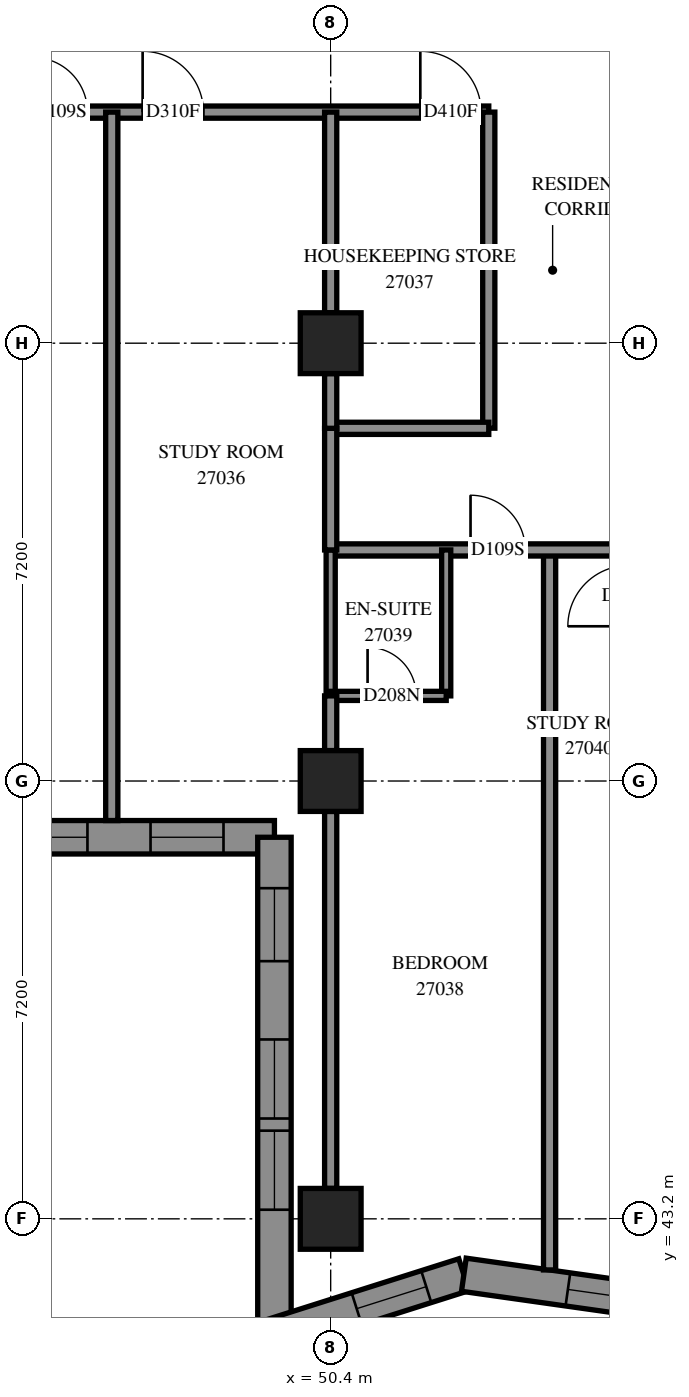
"""IFC4 building model, lengths in metres.
Left out: names, types, materials, properties, quantities, classifications, styles, units other than length and angle.
Written with IfcOpenShell. Run it as: python <this file> out.ifc"""

import sys

from ifc_helpers import new_model, si_unit, direction, frame, frame_2d, origin, origin_2d, place, context, subcontext, project, spatial, polyline, rectangle, outline, extrude, element, fill, save


model = new_model("IFC4")
c1 = context("Model", 3, precision=1e-05, world=origin(), true_north=direction((0.0, 1.0)))
c2 = subcontext(c1, "Body", "Model", "MODEL_VIEW")
j1 = project(units=[si_unit("LENGTHUNIT", "METRE"), si_unit("PLANEANGLEUNIT", "RADIAN")], contexts=[c1])
p1 = place(None, origin())
s1 = spatial("IfcSite", under=j1, at=p1, CompositionType="ELEMENT")
p2 = place(p1, origin())
s2 = spatial("IfcBuilding", under=s1, at=p2, CompositionType="ELEMENT")
p3 = place(p2, frame((0.0, 0.0, 101.6)))
s3 = spatial("IfcBuildingStorey", under=s2, at=p3, CompositionType="ELEMENT", Elevation=101.6)
for number, where, z_axis, x_axis in (
    (1, (50.4, 43.2, 0.0), (0.0, 0.0, 1.0), (1.0, 0.0, 0.0)),
    (2, (50.4, 50.4, 0.0), (0.0, 0.0, 1.0), (1.0, 0.0, 0.0)),
    (3, (50.4, 57.6, 0.0), (0.0, 0.0, 1.0), (1.0, 0.0, 0.0)),
):
    element("IfcColumn", number, at=place(p3, frame(where, z_axis=z_axis, x_axis=x_axis)), inside=s3, PredefinedType="COLUMN", context=c2, shape_type="SweptSolid", body=[
        extrude(rectangle(XDim=1.0, YDim=1.0, at=origin_2d()), origin(), (0.0, 0.0, 1.0), 3.1),
    ])
p4 = place(p3, frame((42.275, 49.475, 0.0), z_axis=(0.0, 0.0, 1.0), x_axis=(1.0, 0.0, 0.0)))
e4 = element("IfcWall", 4, at=p4, inside=s3, PredefinedType="SOLIDWALL", context=c2, shape_type="SweptSolid", body=[
    extrude(outline(polyline([(-0.275, -0.275), (6.925, -0.275), (7.475, 0.275), (0.275, 0.275), (-0.275, -0.275)])), origin(), (0.0, 0.0, 1.0), 3.1),
])
p5 = place(p4, frame((1.325, 0.0, 0.5)))
e5 = element("IfcOpeningElement", 5, at=p5, cuts=e4, PredefinedType="OPENING", context=c2, shape_type="SweptSolid", body=[
    extrude(rectangle(XDim=1.3, YDim=2.45, at=frame_2d((0.65, 1.225))), frame((0.0, 0.285, 0.0), z_axis=(0.0, -1.0, 0.0), x_axis=(1.0, 0.0, 0.0)), (0.0, 0.0, 1.0), 0.57),
])
p6 = place(p4, frame((2.825, 0.0, 0.5)))
e6 = element("IfcOpeningElement", 6, at=p6, cuts=e4, PredefinedType="OPENING", context=c2, shape_type="SweptSolid", body=[
    extrude(rectangle(XDim=1.3, YDim=2.45, at=frame_2d((0.65, 1.225))), frame((0.0, 0.285, 0.0), z_axis=(0.0, -1.0, 0.0), x_axis=(1.0, 0.0, 0.0)), (0.0, 0.0, 1.0), 0.57),
])
p7 = place(p4, frame((5.162, 0.0, 0.5)))
e7 = element("IfcOpeningElement", 7, at=p7, cuts=e4, PredefinedType="OPENING", context=c2, shape_type="SweptSolid", body=[
    extrude(rectangle(XDim=1.2, YDim=2.45, at=frame_2d((0.6, 1.225))), frame((0.0, 0.285, 0.0), z_axis=(0.0, -1.0, 0.0), x_axis=(1.0, 0.0, 0.0)), (0.0, 0.0, 1.0), 0.57),
])
p8 = place(p3, frame((49.475, 49.475, 0.0), z_axis=(0.0, 0.0, 1.0), x_axis=(0.0, -1.0, 0.0)))
e8 = element("IfcWall", 8, at=p8, inside=s3, PredefinedType="SOLIDWALL", context=c2, shape_type="SweptSolid", body=[
    extrude(outline(polyline([(0.275, -0.275), (8.557, -0.275), (7.806, 0.275), (-0.275, 0.275), (0.275, -0.275)])), origin(), (0.0, 0.0, 1.0), 3.1),
])
p9 = place(p8, frame((3.325, 0.0, 0.5)))
e9 = element("IfcOpeningElement", 9, at=p9, cuts=e8, PredefinedType="OPENING", context=c2, shape_type="SweptSolid", body=[
    extrude(rectangle(XDim=1.3, YDim=2.45, at=frame_2d((0.65, 1.225))), frame((0.0, 0.285, 0.0), z_axis=(0.0, -1.0, 0.0), x_axis=(1.0, 0.0, 0.0)), (0.0, 0.0, 1.0), 0.57),
])
p10 = place(p8, frame((4.825, 0.0, 0.5)))
e10 = element("IfcOpeningElement", 10, at=p10, cuts=e8, PredefinedType="OPENING", context=c2, shape_type="SweptSolid", body=[
    extrude(rectangle(XDim=1.3, YDim=2.45, at=frame_2d((0.65, 1.225))), frame((0.0, 0.285, 0.0), z_axis=(0.0, -1.0, 0.0), x_axis=(1.0, 0.0, 0.0)), (0.0, 0.0, 1.0), 0.57),
])
p11 = place(p8, frame((0.838, 0.0, 0.5)))
e11 = element("IfcOpeningElement", 11, at=p11, cuts=e8, PredefinedType="OPENING", context=c2, shape_type="SweptSolid", body=[
    extrude(rectangle(XDim=1.2, YDim=2.45, at=frame_2d((0.6, 1.225))), frame((0.0, 0.285, 0.0), z_axis=(0.0, -1.0, 0.0), x_axis=(1.0, 0.0, 0.0)), (0.0, 0.0, 1.0), 0.57),
])
p12 = place(p3, frame((49.475, 41.294, 0.0), z_axis=(0.0, 0.0, 1.0), x_axis=(0.9532643936, 0.3021373791, 0.0)))
e12 = element("IfcWall", 12, at=p12, inside=s3, PredefinedType="SOLIDWALL", context=c2, shape_type="SweptSolid", body=[
    extrude(outline(polyline([(-0.376, -0.275), (3.205, -0.275), (3.33, 0.275), (0.376, 0.275), (-0.376, -0.275)])), origin(), (0.0, 0.0, 1.0), 3.1),
])
p13 = place(p12, frame((1.419, 0.0, 0.5)))
e13 = element("IfcOpeningElement", 13, at=p13, cuts=e12, PredefinedType="OPENING", context=c2, shape_type="SweptSolid", body=[
    extrude(rectangle(XDim=1.2, YDim=2.45, at=frame_2d((0.6, 1.225))), frame((0.0, 0.285, 0.0), z_axis=(0.0, -1.0, 0.0), x_axis=(1.0, 0.0, 0.0)), (0.0, 0.0, 1.0), 0.57),
])
p14 = place(p3, frame((52.59, 42.281, 0.0), z_axis=(0.0, 0.0, 1.0), x_axis=(0.9901775212, -0.1398158663, 0.0)))
e14 = element("IfcWall", 14, at=p14, inside=s3, PredefinedType="SOLIDWALL", context=c2, shape_type="SweptSolid", body=[
    extrude(outline(polyline([(0.062, -0.275), (3.51, -0.275), (3.432, 0.275), (-0.062, 0.275), (0.062, -0.275)])), origin(), (0.0, 0.0, 1.0), 3.1),
])
p15 = place(p14, frame((1.728, 0.0, 0.5)))
e15 = element("IfcOpeningElement", 15, at=p15, cuts=e14, PredefinedType="OPENING", context=c2, shape_type="SweptSolid", body=[
    extrude(rectangle(XDim=1.2, YDim=2.45, at=frame_2d((0.6, 1.225))), frame((0.0, 0.285, 0.0), z_axis=(0.0, -1.0, 0.0), x_axis=(1.0, 0.0, 0.0)), (0.0, 0.0, 1.0), 0.57),
])
p16 = place(p3, frame((28.8, 61.4, 0.0), z_axis=(0.0, 0.0, 1.0), x_axis=(1.0, 0.0, 0.0)))
e16 = element("IfcWall", 16, at=p16, inside=s3, PredefinedType="PARTITIONING", context=c2, shape_type="SweptSolid", body=[
    extrude(rectangle(XDim=24.2, YDim=0.2, at=frame_2d((12.1, 0.0))), origin(), (0.0, 0.0, 1.0), 3.1),
])
p17 = place(p16, frame((2.3, 0.0, 0.0)))
e17 = element("IfcOpeningElement", 17, at=p17, cuts=e16, PredefinedType="OPENING", context=c2, shape_type="SweptSolid", body=[
    extrude(rectangle(XDim=0.9, YDim=2.1, at=frame_2d((0.45, 1.05))), frame((0.0, 0.11, 0.0), z_axis=(0.0, -1.0, 0.0), x_axis=(1.0, 0.0, 0.0)), (0.0, 0.0, 1.0), 0.22),
])
p18 = place(p16, frame((5.901, 0.0, 0.0)))
e18 = element("IfcOpeningElement", 18, at=p18, cuts=e16, PredefinedType="OPENING", context=c2, shape_type="SweptSolid", body=[
    extrude(rectangle(XDim=0.9, YDim=2.1, at=frame_2d((0.45, 1.05))), frame((0.0, 0.11, 0.0), z_axis=(0.0, -1.0, 0.0), x_axis=(1.0, 0.0, 0.0)), (0.0, 0.0, 1.0), 0.22),
])
p19 = place(p16, frame((11.307, 0.0, 0.0)))
e19 = element("IfcOpeningElement", 19, at=p19, cuts=e16, PredefinedType="OPENING", context=c2, shape_type="SweptSolid", body=[
    extrude(rectangle(XDim=1.0, YDim=2.1, at=frame_2d((0.5, 1.05))), frame((0.0, 0.11, 0.0), z_axis=(0.0, -1.0, 0.0), x_axis=(1.0, 0.0, 0.0)), (0.0, 0.0, 1.0), 0.22),
])
p20 = place(p16, frame((16.7, 0.0, 0.0)))
e20 = element("IfcOpeningElement", 20, at=p20, cuts=e16, PredefinedType="OPENING", context=c2, shape_type="SweptSolid", body=[
    extrude(rectangle(XDim=0.9, YDim=2.1, at=frame_2d((0.45, 1.05))), frame((0.0, 0.11, 0.0), z_axis=(0.0, -1.0, 0.0), x_axis=(1.0, 0.0, 0.0)), (0.0, 0.0, 1.0), 0.22),
])
p21 = place(p16, frame((18.508, 0.0, 0.0)))
e21 = element("IfcOpeningElement", 21, at=p21, cuts=e16, PredefinedType="OPENING", context=c2, shape_type="SweptSolid", body=[
    extrude(rectangle(XDim=1.0, YDim=2.1, at=frame_2d((0.5, 1.05))), frame((0.0, 0.11, 0.0), z_axis=(0.0, -1.0, 0.0), x_axis=(1.0, 0.0, 0.0)), (0.0, 0.0, 1.0), 0.22),
])
p22 = place(p16, frame((23.074, 0.0, 0.0)))
e22 = element("IfcOpeningElement", 22, at=p22, cuts=e16, PredefinedType="OPENING", context=c2, shape_type="SweptSolid", body=[
    extrude(rectangle(XDim=1.0, YDim=2.1, at=frame_2d((0.5, 1.05))), frame((0.0, 0.11, 0.0), z_axis=(0.0, -1.0, 0.0), x_axis=(1.0, 0.0, 0.0)), (0.0, 0.0, 1.0), 0.22),
])
p23 = place(p3, frame((54.0, 42.36, 0.0), z_axis=(0.0, 0.0, 1.0), x_axis=(0.0, 1.0, 0.0)))
e23 = element("IfcWall", 23, at=p23, inside=s3, PredefinedType="PARTITIONING", context=c2, shape_type="SweptSolid", body=[
    extrude(rectangle(XDim=11.84, YDim=0.2, at=frame_2d((5.92, 0.0))), origin(), (0.0, 0.0, 1.0), 3.1),
])
p24 = place(p3, frame((46.8, 49.75, 0.0), z_axis=(0.0, 0.0, 1.0), x_axis=(0.0, 1.0, 0.0)))
e24 = element("IfcWall", 24, at=p24, inside=s3, PredefinedType="PARTITIONING", context=c2, shape_type="SweptSolid", body=[
    extrude(rectangle(XDim=11.65, YDim=0.2, at=frame_2d((5.825, 0.0))), origin(), (0.0, 0.0, 1.0), 3.1),
])
p25 = place(p3, frame((50.4, 43.7, 0.0), z_axis=(0.0, 0.0, 1.0), x_axis=(0.0, 1.0, 0.0)))
e25 = element("IfcWall", 25, at=p25, inside=s3, PredefinedType="PARTITIONING", context=c2, shape_type="SweptSolid", body=[
    extrude(rectangle(XDim=6.2, YDim=0.2, at=frame_2d((3.1, 0.0))), origin(), (0.0, 0.0, 1.0), 2.6),
])
p26 = place(p3, frame((53.0, 56.202, 0.0), z_axis=(0.0, 0.0, 1.0), x_axis=(0.0, 1.0, 0.0)))
e26 = element("IfcWall", 26, at=p26, inside=s3, PredefinedType="PARTITIONING", context=c2, shape_type="SweptSolid", body=[
    extrude(rectangle(XDim=5.198, YDim=0.2, at=frame_2d((2.599, 0.0))), origin(), (0.0, 0.0, 1.0), 3.1),
])
p27 = place(p3, frame((50.4, 54.2, 0.0), z_axis=(0.0, 0.0, 1.0), x_axis=(1.0, 0.0, 0.0)))
e27 = element("IfcWall", 27, at=p27, inside=s3, PredefinedType="PARTITIONING", context=c2, shape_type="SweptSolid", body=[
    extrude(rectangle(XDim=4.9, YDim=0.2, at=frame_2d((2.45, 0.0))), origin(), (0.0, 0.0, 1.0), 3.1),
])
p28 = place(p27, frame((2.3, 0.0, 0.0)))
e28 = element("IfcOpeningElement", 28, at=p28, cuts=e27, PredefinedType="OPENING", context=c2, shape_type="SweptSolid", body=[
    extrude(rectangle(XDim=0.9, YDim=2.1, at=frame_2d((0.45, 1.05))), frame((0.0, 0.11, 0.0), z_axis=(0.0, -1.0, 0.0), x_axis=(1.0, 0.0, 0.0)), (0.0, 0.0, 1.0), 0.22),
])
p29 = place(p3, frame((50.4, 58.1, 0.0), z_axis=(0.0, 0.0, 1.0), x_axis=(0.0, 1.0, 0.0)))
e29 = element("IfcWall", 29, at=p29, inside=s3, PredefinedType="PARTITIONING", context=c2, shape_type="SweptSolid", body=[
    extrude(rectangle(XDim=3.3, YDim=0.2, at=frame_2d((1.65, 0.0))), origin(), (0.0, 0.0, 1.0), 3.1),
])
p30 = place(p3, frame((50.4, 56.2, 0.0), z_axis=(0.0, 0.0, 1.0), x_axis=(1.0, 0.0, 0.0)))
e30 = element("IfcWall", 30, at=p30, inside=s3, PredefinedType="PARTITIONING", context=c2, shape_type="SweptSolid", body=[
    extrude(rectangle(XDim=2.6, YDim=0.2, at=frame_2d((1.3, 0.0))), origin(), (0.0, 0.0, 1.0), 3.1),
])
for number, where, z_axis, x_axis in (
    (31, (52.3, 51.8, 0.0), (0.0, 0.0, 1.0), (0.0, 1.0, 0.0)),
    (32, (50.4, 51.8, 0.0), (0.0, 0.0, 1.0), (0.0, 1.0, 0.0)),
):
    element("IfcWall", number, at=place(p3, frame(where, z_axis=z_axis, x_axis=x_axis)), inside=s3, PredefinedType="PARTITIONING", context=c2, shape_type="SweptSolid", body=[
        extrude(rectangle(XDim=2.4, YDim=0.15, at=frame_2d((1.2, 0.0))), origin(), (0.0, 0.0, 1.0), 3.1),
    ])
p31 = place(p3, frame((50.4, 54.2, 0.0), z_axis=(0.0, 0.0, 1.0), x_axis=(0.0, 1.0, 0.0)))
e33 = element("IfcWall", 33, at=p31, inside=s3, PredefinedType="PARTITIONING", context=c2, shape_type="SweptSolid", body=[
    extrude(rectangle(XDim=2.0, YDim=0.2, at=frame_2d((1.0, 0.0))), origin(), (0.0, 0.0, 1.0), 3.1),
])
p32 = place(p3, frame((50.4, 51.8, 0.0), z_axis=(0.0, 0.0, 1.0), x_axis=(1.0, 0.0, 0.0)))
e34 = element("IfcWall", 34, at=p32, inside=s3, PredefinedType="PARTITIONING", context=c2, shape_type="SweptSolid", body=[
    extrude(rectangle(XDim=1.9, YDim=0.15, at=frame_2d((0.95, 0.0))), origin(), (0.0, 0.0, 1.0), 3.1),
])
p33 = place(p32, frame((0.607, 0.0, 0.0)))
e35 = element("IfcOpeningElement", 35, at=p33, cuts=e34, PredefinedType="OPENING", context=c2, shape_type="SweptSolid", body=[
    extrude(rectangle(XDim=0.8, YDim=2.1, at=frame_2d((0.4, 1.05))), frame((0.0, 0.085, 0.0), z_axis=(0.0, -1.0, 0.0), x_axis=(1.0, 0.0, 0.0)), (0.0, 0.0, 1.0), 0.17),
])
for number, where, z_axis, x_axis in (
    (36, (50.4, 50.9, 0.0), (0.0, 0.0, 1.0), (0.0, 1.0, 0.0)),
    (37, (50.4, 56.2, 0.0), (0.0, 0.0, 1.0), (0.0, 1.0, 0.0)),
):
    element("IfcWall", number, at=place(p3, frame(where, z_axis=z_axis, x_axis=x_axis)), inside=s3, PredefinedType="PARTITIONING", context=c2, shape_type="SweptSolid", body=[
        extrude(rectangle(XDim=0.9, YDim=0.2, at=frame_2d((0.45, 0.0))), origin(), (0.0, 0.0, 1.0), 3.1),
    ])
p34 = place(p6, origin())
e38 = element("IfcWindow", 38, at=p34, inside=s3, PartitioningType="SINGLE_PANEL", PredefinedType="WINDOW", context=c2, shape_type="SweptSolid", body=[
    extrude(rectangle(XDim=1.3, YDim=2.45, at=frame_2d((0.65, 1.225))), frame((0.0, 0.155, 0.0), z_axis=(0.0, -1.0, 0.0), x_axis=(1.0, 0.0, 0.0)), (0.0, 0.0, 1.0), 0.06),
])
fill(e6, e38)
p35 = place(p7, origin())
e39 = element("IfcWindow", 39, at=p35, inside=s3, PartitioningType="SINGLE_PANEL", PredefinedType="WINDOW", context=c2, shape_type="SweptSolid", body=[
    extrude(rectangle(XDim=1.2, YDim=2.45, at=frame_2d((0.6, 1.225))), frame((0.0, 0.155, 0.0), z_axis=(0.0, -1.0, 0.0), x_axis=(1.0, 0.0, 0.0)), (0.0, 0.0, 1.0), 0.06),
])
fill(e7, e39)
p36 = place(p9, origin())
e40 = element("IfcWindow", 40, at=p36, inside=s3, PartitioningType="SINGLE_PANEL", PredefinedType="WINDOW", context=c2, shape_type="SweptSolid", body=[
    extrude(rectangle(XDim=1.3, YDim=2.45, at=frame_2d((0.65, 1.225))), frame((0.0, 0.155, 0.0), z_axis=(0.0, -1.0, 0.0), x_axis=(1.0, 0.0, 0.0)), (0.0, 0.0, 1.0), 0.06),
])
fill(e9, e40)
p37 = place(p10, origin())
e41 = element("IfcWindow", 41, at=p37, inside=s3, PartitioningType="SINGLE_PANEL", PredefinedType="WINDOW", context=c2, shape_type="SweptSolid", body=[
    extrude(rectangle(XDim=1.3, YDim=2.45, at=frame_2d((0.65, 1.225))), frame((0.0, 0.155, 0.0), z_axis=(0.0, -1.0, 0.0), x_axis=(1.0, 0.0, 0.0)), (0.0, 0.0, 1.0), 0.06),
])
fill(e10, e41)
p38 = place(p11, origin())
e42 = element("IfcWindow", 42, at=p38, inside=s3, PartitioningType="SINGLE_PANEL", PredefinedType="WINDOW", context=c2, shape_type="SweptSolid", body=[
    extrude(rectangle(XDim=1.2, YDim=2.45, at=frame_2d((0.6, 1.225))), frame((0.0, 0.155, 0.0), z_axis=(0.0, -1.0, 0.0), x_axis=(1.0, 0.0, 0.0)), (0.0, 0.0, 1.0), 0.06),
])
fill(e11, e42)
p39 = place(p13, origin())
e43 = element("IfcWindow", 43, at=p39, inside=s3, PartitioningType="SINGLE_PANEL", PredefinedType="WINDOW", context=c2, shape_type="SweptSolid", body=[
    extrude(rectangle(XDim=1.2, YDim=2.45, at=frame_2d((0.6, 1.225))), frame((0.0, 0.155, 0.0), z_axis=(0.0, -1.0, 0.0), x_axis=(1.0, 0.0, 0.0)), (0.0, 0.0, 1.0), 0.06),
])
fill(e13, e43)
p40 = place(p15, origin())
e44 = element("IfcWindow", 44, at=p40, inside=s3, PartitioningType="SINGLE_PANEL", PredefinedType="WINDOW", context=c2, shape_type="SweptSolid", body=[
    extrude(rectangle(XDim=1.2, YDim=2.45, at=frame_2d((0.6, 1.225))), frame((0.0, 0.155, 0.0), z_axis=(0.0, -1.0, 0.0), x_axis=(1.0, 0.0, 0.0)), (0.0, 0.0, 1.0), 0.06),
])
fill(e15, e44)
p41 = place(p20, origin())
e45 = element("IfcDoor", 45, at=p41, inside=s3, OperationType="SINGLE_SWING_LEFT", PredefinedType="DOOR", context=c2, shape_type="SweptSolid", body=[
    extrude(rectangle(XDim=0.9, YDim=2.1, at=frame_2d((0.45, 1.05))), frame((0.0, 0.025, 0.0), z_axis=(0.0, -1.0, 0.0), x_axis=(1.0, 0.0, 0.0)), (0.0, 0.0, 1.0), 0.05),
])
fill(e20, e45)
p42 = place(p21, origin())
e46 = element("IfcDoor", 46, at=p42, inside=s3, OperationType="SINGLE_SWING_RIGHT", PredefinedType="DOOR", context=c2, shape_type="SweptSolid", body=[
    extrude(rectangle(XDim=1.0, YDim=2.1, at=frame_2d((0.5, 1.05))), frame((0.0, 0.025, 0.0), z_axis=(0.0, -1.0, 0.0), x_axis=(1.0, 0.0, 0.0)), (0.0, 0.0, 1.0), 0.05),
])
fill(e21, e46)
p43 = place(p22, origin())
e47 = element("IfcDoor", 47, at=p43, inside=s3, OperationType="SINGLE_SWING_LEFT", PredefinedType="DOOR", context=c2, shape_type="SweptSolid", body=[
    extrude(rectangle(XDim=1.0, YDim=2.1, at=frame_2d((0.5, 1.05))), frame((0.0, 0.025, 0.0), z_axis=(0.0, -1.0, 0.0), x_axis=(1.0, 0.0, 0.0)), (0.0, 0.0, 1.0), 0.05),
])
fill(e22, e47)
p44 = place(p28, origin())
e48 = element("IfcDoor", 48, at=p44, inside=s3, OperationType="SINGLE_SWING_LEFT", PredefinedType="DOOR", context=c2, shape_type="SweptSolid", body=[
    extrude(rectangle(XDim=0.9, YDim=2.1, at=frame_2d((0.45, 1.05))), frame((0.0, 0.025, 0.0), z_axis=(0.0, -1.0, 0.0), x_axis=(1.0, 0.0, 0.0)), (0.0, 0.0, 1.0), 0.05),
])
fill(e28, e48)
p45 = place(p33, origin())
e49 = element("IfcDoor", 49, at=p45, inside=s3, OperationType="SINGLE_SWING_RIGHT", PredefinedType="DOOR", context=c2, shape_type="SweptSolid", body=[
    extrude(rectangle(XDim=0.8, YDim=2.1, at=frame_2d((0.4, 1.05))), frame((0.0, 0.025, 0.0), z_axis=(0.0, -1.0, 0.0), x_axis=(1.0, 0.0, 0.0)), (0.0, 0.0, 1.0), 0.05),
])
fill(e35, e49)
save(model, sys.argv[1])
